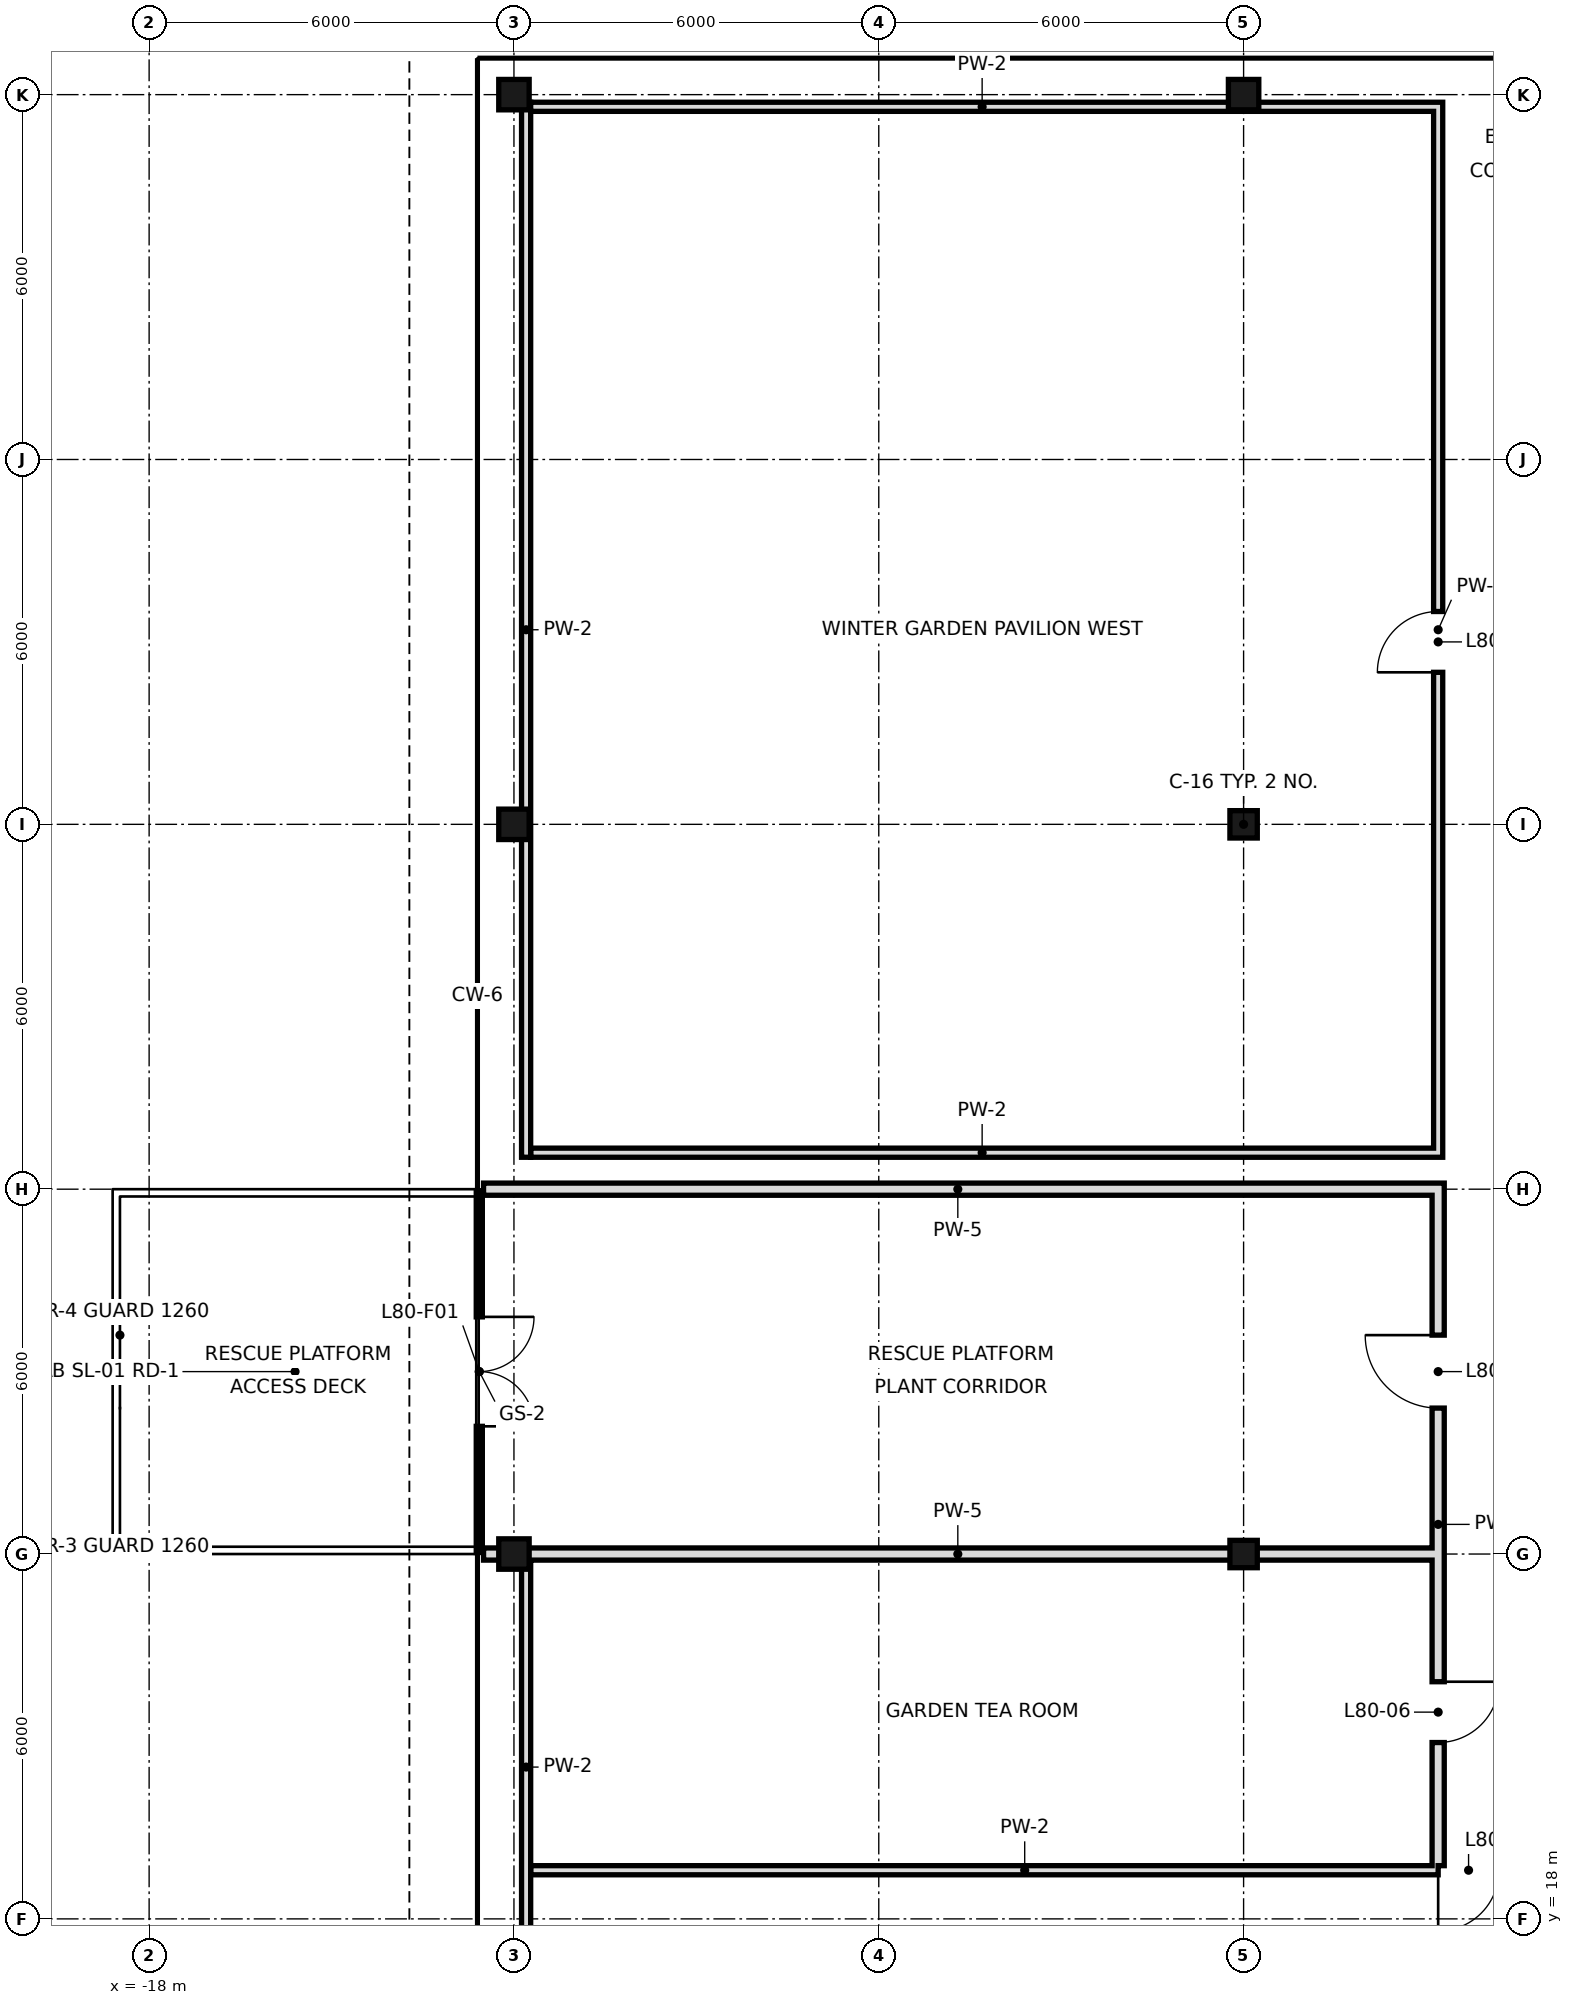
"""IFC4 building model, lengths in metres.
Left out: names, types, materials, properties, quantities, classifications, styles, units other than length and angle.
Written with IfcOpenShell. Run it as: python <this file> out.ifc"""

import sys

from ifc_helpers import new_model, si_unit, direction, frame, frame_2d, origin, origin_2d, place, context, subcontext, project, spatial, rectangle, hollow_rectangle, extrude, element, fill, save


model = new_model("IFC4")
c1 = context("Model", 3, precision=1e-05, world=origin(), true_north=direction((0.0, 1.0)))
c2 = subcontext(c1, "Body", "Model", "MODEL_VIEW")
j1 = project(units=[si_unit("LENGTHUNIT", "METRE"), si_unit("PLANEANGLEUNIT", "RADIAN")], contexts=[c1])
p1 = place(None, origin())
s1 = spatial("IfcSite", under=j1, at=p1, CompositionType="ELEMENT")
p2 = place(p1, origin())
s2 = spatial("IfcBuilding", under=s1, at=p2, CompositionType="ELEMENT")
p3 = place(p2, frame((0.0, 0.0, 337.8)))
s3 = spatial("IfcBuildingStorey", under=s2, at=p3, CompositionType="ELEMENT", Elevation=337.8)
for number, where, z_axis, x_axis in (
    (1, (-12.0, 24.0, 0.0), (0.0, 0.0, 1.0), (1.0, 0.0, 0.0)),
    (2, (-12.0, 36.0, 0.0), (0.0, 0.0, 1.0), (1.0, 0.0, 0.0)),
    (3, (-12.0, 48.0, 0.0), (0.0, 0.0, 1.0), (1.0, 0.0, 0.0)),
):
    element("IfcColumn", number, at=place(p3, frame(where, z_axis=z_axis, x_axis=x_axis)), inside=s3, PredefinedType="COLUMN", context=c2, shape_type="SweptSolid", body=[
        extrude(hollow_rectangle(XDim=0.5, YDim=0.5, WallThickness=0.025, at=origin_2d()), origin(), (0.0, 0.0, 1.0), 4.0),
    ])
for number, where, z_axis, x_axis in (
    (4, (0.0, 24.0, 0.0), (0.0, 0.0, 1.0), (1.0, 0.0, 0.0)),
    (5, (0.0, 36.0, 0.0), (0.0, 0.0, 1.0), (1.0, 0.0, 0.0)),
):
    element("IfcColumn", number, at=place(p3, frame(where, z_axis=z_axis, x_axis=x_axis)), inside=s3, PredefinedType="COLUMN", context=c2, shape_type="SweptSolid", body=[
        extrude(hollow_rectangle(XDim=0.45, YDim=0.45, WallThickness=0.022, at=origin_2d()), origin(), (0.0, 0.0, 1.0), 4.0),
    ])
p4 = place(p3, frame((0.0, 48.0, 0.0), z_axis=(0.0, 0.0, 1.0), x_axis=(1.0, 0.0, 0.0)))
e6 = element("IfcColumn", 6, at=p4, inside=s3, PredefinedType="COLUMN", context=c2, shape_type="SweptSolid", body=[
    extrude(hollow_rectangle(XDim=0.5, YDim=0.5, WallThickness=0.025, at=origin_2d()), origin(), (0.0, 0.0, 1.0), 4.0),
])
p5 = place(p3, frame((-12.57, 29.975, 0.0), z_axis=(0.0, 0.0, 1.0), x_axis=(0.0, -1.0, 0.0)))
e7 = element("IfcWall", 7, at=p5, inside=s3, PredefinedType="SOLIDWALL", context=c2, shape_type="SweptSolid", body=[
    extrude(rectangle(XDim=5.95, YDim=0.1, at=frame_2d((2.975, 0.0))), origin(), (0.0, 0.0, 1.0), 3.75),
])
p6 = place(p5, frame((2.075, 0.0, 0.0)))
e8 = element("IfcOpeningElement", 8, at=p6, cuts=e7, PredefinedType="OPENING", context=c2, shape_type="SweptSolid", body=[
    extrude(rectangle(XDim=1.8, YDim=2.4, at=frame_2d((0.9, 1.2))), frame((0.0, 0.06, 0.0), z_axis=(0.0, -1.0, 0.0), x_axis=(1.0, 0.0, 0.0)), (0.0, 0.0, 1.0), 0.12),
])
p7 = place(p3, frame((-11.8, 17.093, 0.0), z_axis=(0.0, 0.0, 1.0), x_axis=(0.0, 1.0, 0.0)))
e9 = element("IfcWall", 9, at=p7, inside=s3, PredefinedType="PARTITIONING", context=c2, shape_type="SweptSolid", body=[
    extrude(rectangle(XDim=6.807, YDim=0.15, at=frame_2d((3.403, 0.0))), origin(), (0.0, 0.0, 1.0), 3.05),
])
p8 = place(p3, frame((-11.8, 30.525, 0.0), z_axis=(0.0, 0.0, 1.0), x_axis=(0.0, 1.0, 0.0)))
e10 = element("IfcWall", 10, at=p8, inside=s3, PredefinedType="PARTITIONING", context=c2, shape_type="SweptSolid", body=[
    extrude(rectangle(XDim=17.35, YDim=0.15, at=frame_2d((8.675, 0.0))), origin(), (0.0, 0.0, 1.0), 3.05),
])
p9 = place(p3, frame((3.2, 18.875, 0.0), z_axis=(0.0, 0.0, 1.0), x_axis=(0.0, 1.0, 0.0)))
e11 = element("IfcWall", 11, at=p9, inside=s3, PredefinedType="SOLIDWALL", context=c2, shape_type="SweptSolid", body=[
    extrude(rectangle(XDim=11.225, YDim=0.2, at=frame_2d((5.613, 0.0))), origin(), (0.0, 0.0, 1.0), 3.3),
])
p10 = place(p9, frame((2.025, 0.0, 0.0)))
e12 = element("IfcOpeningElement", 12, at=p10, cuts=e11, PredefinedType="OPENING", context=c2, shape_type="SweptSolid", body=[
    extrude(rectangle(XDim=1.0, YDim=2.4, at=frame_2d((0.5, 1.2))), frame((0.0, 0.11, 0.0), z_axis=(0.0, -1.0, 0.0), x_axis=(1.0, 0.0, 0.0)), (0.0, 0.0, 1.0), 0.22),
])
p11 = place(p9, frame((7.525, 0.0, 0.0)))
e13 = element("IfcOpeningElement", 13, at=p11, cuts=e11, PredefinedType="OPENING", context=c2, shape_type="SweptSolid", body=[
    extrude(rectangle(XDim=1.2, YDim=2.4, at=frame_2d((0.6, 1.2))), frame((0.0, 0.11, 0.0), z_axis=(0.0, -1.0, 0.0), x_axis=(1.0, 0.0, 0.0)), (0.0, 0.0, 1.0), 0.22),
])
p12 = place(p3, frame((3.2, 30.525, 0.0), z_axis=(0.0, 0.0, 1.0), x_axis=(0.0, 1.0, 0.0)))
e14 = element("IfcWall", 14, at=p12, inside=s3, PredefinedType="PARTITIONING", context=c2, shape_type="SweptSolid", body=[
    extrude(rectangle(XDim=17.35, YDim=0.15, at=frame_2d((8.675, 0.0))), origin(), (0.0, 0.0, 1.0), 3.75),
])
p13 = place(p12, frame((7.975, 0.0, 0.0)))
e15 = element("IfcOpeningElement", 15, at=p13, cuts=e14, PredefinedType="OPENING", context=c2, shape_type="SweptSolid", body=[
    extrude(rectangle(XDim=1.0, YDim=2.4, at=frame_2d((0.5, 1.2))), frame((0.0, 0.085, 0.0), z_axis=(0.0, -1.0, 0.0), x_axis=(1.0, 0.0, 0.0)), (0.0, 0.0, 1.0), 0.17),
])
p14 = place(p3, frame((-11.725, 18.8, 0.0), z_axis=(0.0, 0.0, 1.0), x_axis=(1.0, 0.0, 0.0)))
e16 = element("IfcWall", 16, at=p14, inside=s3, PredefinedType="PARTITIONING", context=c2, shape_type="SweptSolid", body=[
    extrude(rectangle(XDim=16.25, YDim=0.15, at=frame_2d((8.125, 0.0))), origin(), (0.0, 0.0, 1.0), 3.75),
])
p15 = place(p14, frame((14.925, 0.0, 0.0)))
e17 = element("IfcOpeningElement", 17, at=p15, cuts=e16, PredefinedType="OPENING", context=c2, shape_type="SweptSolid", body=[
    extrude(rectangle(XDim=1.0, YDim=2.4, at=frame_2d((0.5, 1.2))), frame((0.0, 0.085, 0.0), z_axis=(0.0, -1.0, 0.0), x_axis=(1.0, 0.0, 0.0)), (0.0, 0.0, 1.0), 0.17),
])
for number, where, z_axis, x_axis in (
    (18, (-12.5, 24.0, 0.0), (0.0, 0.0, 1.0), (1.0, 0.0, 0.0)),
    (19, (-12.5, 30.0, 0.0), (0.0, 0.0, 1.0), (1.0, 0.0, 0.0)),
):
    element("IfcWall", number, at=place(p3, frame(where, z_axis=z_axis, x_axis=x_axis)), inside=s3, PredefinedType="SOLIDWALL", context=c2, shape_type="SweptSolid", body=[
        extrude(rectangle(XDim=15.6, YDim=0.2, at=frame_2d((7.8, 0.0))), origin(), (0.0, 0.0, 1.0), 3.05),
    ])
p16 = place(p3, frame((-11.725, 30.6, 0.0), z_axis=(0.0, 0.0, 1.0), x_axis=(1.0, 0.0, 0.0)))
e20 = element("IfcWall", 20, at=p16, inside=s3, PredefinedType="PARTITIONING", context=c2, shape_type="SweptSolid", body=[
    extrude(rectangle(XDim=14.85, YDim=0.15, at=frame_2d((7.425, 0.0))), origin(), (0.0, 0.0, 1.0), 3.75),
])
p17 = place(p3, frame((-11.725, 47.8, 0.0), z_axis=(0.0, 0.0, 1.0), x_axis=(1.0, 0.0, 0.0)))
e21 = element("IfcWall", 21, at=p17, inside=s3, PredefinedType="PARTITIONING", context=c2, shape_type="SweptSolid", body=[
    extrude(rectangle(XDim=14.85, YDim=0.15, at=frame_2d((7.425, 0.0))), origin(), (0.0, 0.0, 1.0), 3.05),
])
p18 = place(p6, origin())
e22 = element("IfcDoor", 22, at=p18, inside=s3, OperationType="DOUBLE_DOOR_SINGLE_SWING", PredefinedType="DOOR", context=c2, shape_type="SweptSolid", body=[
    extrude(rectangle(XDim=1.8, YDim=2.4, at=frame_2d((0.9, 1.2))), frame((0.0, 0.025, 0.0), z_axis=(0.0, -1.0, 0.0), x_axis=(1.0, 0.0, 0.0)), (0.0, 0.0, 1.0), 0.05),
])
fill(e8, e22)
p19 = place(p13, origin())
e23 = element("IfcDoor", 23, at=p19, inside=s3, OperationType="SINGLE_SWING_LEFT", PredefinedType="DOOR", context=c2, shape_type="SweptSolid", body=[
    extrude(rectangle(XDim=1.0, YDim=2.4, at=frame_2d((0.5, 1.2))), frame((0.0, 0.025, 0.0), z_axis=(0.0, -1.0, 0.0), x_axis=(1.0, 0.0, 0.0)), (0.0, 0.0, 1.0), 0.05),
])
fill(e15, e23)
p20 = place(p10, origin())
e24 = element("IfcDoor", 24, at=p20, inside=s3, OperationType="SINGLE_SWING_RIGHT", PredefinedType="DOOR", context=c2, shape_type="SweptSolid", body=[
    extrude(rectangle(XDim=1.0, YDim=2.4, at=frame_2d((0.5, 1.2))), frame((0.0, 0.025, 0.0), z_axis=(0.0, -1.0, 0.0), x_axis=(1.0, 0.0, 0.0)), (0.0, 0.0, 1.0), 0.05),
])
fill(e12, e24)
p21 = place(p15, frame((1.0, 0.0, 0.0), z_axis=(0.0, 0.0, 1.0), x_axis=(-1.0, 0.0, 0.0)))
e25 = element("IfcDoor", 25, at=p21, inside=s3, OperationType="SINGLE_SWING_RIGHT", PredefinedType="DOOR", context=c2, shape_type="SweptSolid", body=[
    extrude(rectangle(XDim=1.0, YDim=2.4, at=frame_2d((0.5, 1.2))), frame((0.0, 0.025, 0.0), z_axis=(0.0, -1.0, 0.0), x_axis=(1.0, 0.0, 0.0)), (0.0, 0.0, 1.0), 0.05),
])
fill(e17, e25)
p22 = place(p11, frame((1.2, 0.0, 0.0), z_axis=(0.0, 0.0, 1.0), x_axis=(-1.0, 0.0, 0.0)))
e26 = element("IfcDoor", 26, at=p22, inside=s3, OperationType="SINGLE_SWING_LEFT", PredefinedType="DOOR", context=c2, shape_type="SweptSolid", body=[
    extrude(rectangle(XDim=1.2, YDim=2.4, at=frame_2d((0.6, 1.2))), frame((0.0, 0.025, 0.0), z_axis=(0.0, -1.0, 0.0), x_axis=(1.0, 0.0, 0.0)), (0.0, 0.0, 1.0), 0.05),
])
fill(e13, e26)
save(model, sys.argv[1])
